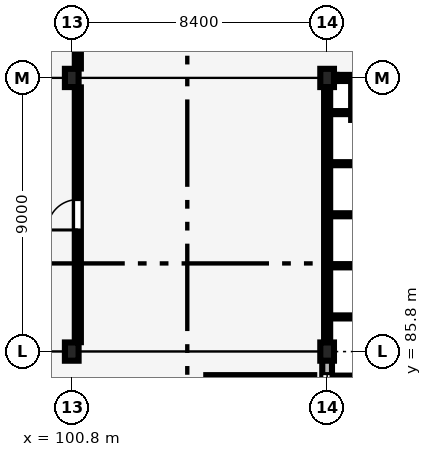
"""IFC4 building model, lengths in metres.
Left out: names, types, materials, properties, quantities, classifications, styles, units other than length and angle.
Written with IfcOpenShell. Run it as: python <this file> out.ifc"""

import sys

from ifc_helpers import new_model, si_unit, direction, frame, frame_2d, origin, origin_2d, place, context, subcontext, project, spatial, rectangle, extrude, element, fill, save


model = new_model("IFC4")
c1 = context("Model", 3, precision=1e-05, world=origin(), true_north=direction((0.0, 1.0)))
c2 = subcontext(c1, "Body", "Model", "MODEL_VIEW")
j1 = project(units=[si_unit("LENGTHUNIT", "METRE"), si_unit("PLANEANGLEUNIT", "RADIAN")], contexts=[c1])
p1 = place(None, origin())
s1 = spatial("IfcSite", under=j1, at=p1, CompositionType="ELEMENT")
p2 = place(p1, origin())
s2 = spatial("IfcBuilding", under=s1, at=p2, CompositionType="ELEMENT")
p3 = place(p2, frame((0.0, 0.0, 13.2)))
s3 = spatial("IfcBuildingStorey", under=s2, at=p3, CompositionType="ELEMENT", Elevation=13.2)
for number, where, z_axis, x_axis in (
    (1, (100.8, 85.8, 0.0), (0.0, 0.0, 1.0), (1.0, 0.0, 0.0)),
    (2, (100.8, 94.8, 0.0), (0.0, 0.0, 1.0), (1.0, 0.0, 0.0)),
    (3, (109.2, 85.8, 0.0), (0.0, 0.0, 1.0), (1.0, 0.0, 0.0)),
    (4, (109.2, 94.8, 0.0), (0.0, 0.0, 1.0), (1.0, 0.0, 0.0)),
):
    element("IfcColumn", number, at=place(p3, frame(where, z_axis=z_axis, x_axis=x_axis)), inside=s3, PredefinedType="COLUMN", context=c2, shape_type="SweptSolid", body=[
        extrude(rectangle(XDim=0.45, YDim=0.6, at=origin_2d()), origin(), (0.0, 0.0, 1.0), 4.2),
    ])
p4 = place(p3, frame((109.2, 77.675, 0.0), z_axis=(0.0, 0.0, 1.0), x_axis=(0.0, 1.0, 0.0)))
e5 = element("IfcWall", 5, at=p4, inside=s3, PredefinedType="SOLIDWALL", context=c2, shape_type="SweptSolid", body=[
    extrude(rectangle(XDim=7.85, YDim=0.32, at=frame_2d((3.925, 0.0))), origin(), (0.0, 0.0, 1.0), 2.94),
])
p5 = place(p4, frame((0.45, 0.0, 0.85)))
e6 = element("IfcOpeningElement", 6, at=p5, cuts=e5, PredefinedType="OPENING", context=c2, shape_type="SweptSolid", body=[
    extrude(rectangle(XDim=1.2, YDim=1.8, at=frame_2d((0.6, 0.9))), frame((0.0, 0.17, 0.0), z_axis=(0.0, -1.0, 0.0), x_axis=(1.0, 0.0, 0.0)), (0.0, 0.0, 1.0), 0.34),
])
p6 = place(p4, frame((6.2, 0.0, 0.85)))
e7 = element("IfcOpeningElement", 7, at=p6, cuts=e5, PredefinedType="OPENING", context=c2, shape_type="SweptSolid", body=[
    extrude(rectangle(XDim=1.2, YDim=1.8, at=frame_2d((0.6, 0.9))), frame((0.0, 0.17, 0.0), z_axis=(0.0, -1.0, 0.0), x_axis=(1.0, 0.0, 0.0)), (0.0, 0.0, 1.0), 0.34),
])
p7 = place(p3, frame((105.225, 84.85, 0.0), z_axis=(0.0, 0.0, 1.0), x_axis=(1.0, 0.0, 0.0)))
e8 = element("IfcWall", 8, at=p7, inside=s3, PredefinedType="SHEAR", context=c2, shape_type="SweptSolid", body=[
    extrude(rectangle(XDim=3.55, YDim=0.35, at=frame_2d((1.775, 0.0))), origin(), (0.0, 0.0, 1.0), 3.92),
])
p8 = place(p3, frame((101.0, 95.11, 0.0), z_axis=(0.0, 0.0, 1.0), x_axis=(0.0, 1.0, 0.0)))
e9 = element("IfcWall", 9, at=p8, inside=s3, PredefinedType="PARTITIONING", context=c2, shape_type="SweptSolid", body=[
    extrude(rectangle(XDim=5.785, YDim=0.2, at=frame_2d((2.893, 0.0))), origin(), (0.0, 0.0, 1.0), 3.48),
])
p9 = place(p3, frame((101.0, 86.11, 0.0), z_axis=(0.0, 0.0, 1.0), x_axis=(0.0, 1.0, 0.0)))
e10 = element("IfcWall", 10, at=p9, inside=s3, PredefinedType="PARTITIONING", context=c2, shape_type="SweptSolid", body=[
    extrude(rectangle(XDim=8.38, YDim=0.2, at=frame_2d((4.19, 0.0))), origin(), (0.0, 0.0, 1.0), 3.43),
])
p10 = place(p9, frame((3.69, 0.0, 0.0)))
e11 = element("IfcOpeningElement", 11, at=p10, cuts=e10, PredefinedType="OPENING", context=c2, shape_type="SweptSolid", body=[
    extrude(rectangle(XDim=1.0, YDim=2.15, at=frame_2d((0.5, 1.075))), frame((0.0, 0.11, 0.0), z_axis=(0.0, -1.0, 0.0), x_axis=(1.0, 0.0, 0.0)), (0.0, 0.0, 1.0), 0.22),
])
p11 = place(p6, origin())
e12 = element("IfcWindow", 12, at=p11, inside=s3, PartitioningType="SINGLE_PANEL", PredefinedType="WINDOW", context=c2, shape_type="SweptSolid", body=[
    extrude(rectangle(XDim=1.2, YDim=1.8, at=frame_2d((0.6, 0.9))), frame((0.0, 0.03, 0.0), z_axis=(0.0, -1.0, 0.0), x_axis=(1.0, 0.0, 0.0)), (0.0, 0.0, 1.0), 0.06),
])
fill(e7, e12)
p12 = place(p10, origin())
e13 = element("IfcDoor", 13, at=p12, inside=s3, OperationType="SINGLE_SWING_LEFT", PredefinedType="DOOR", context=c2, shape_type="SweptSolid", body=[
    extrude(rectangle(XDim=1.0, YDim=2.15, at=frame_2d((0.5, 1.075))), frame((0.0, 0.025, 0.0), z_axis=(0.0, -1.0, 0.0), x_axis=(1.0, 0.0, 0.0)), (0.0, 0.0, 1.0), 0.05),
])
fill(e11, e13)
save(model, sys.argv[1])
